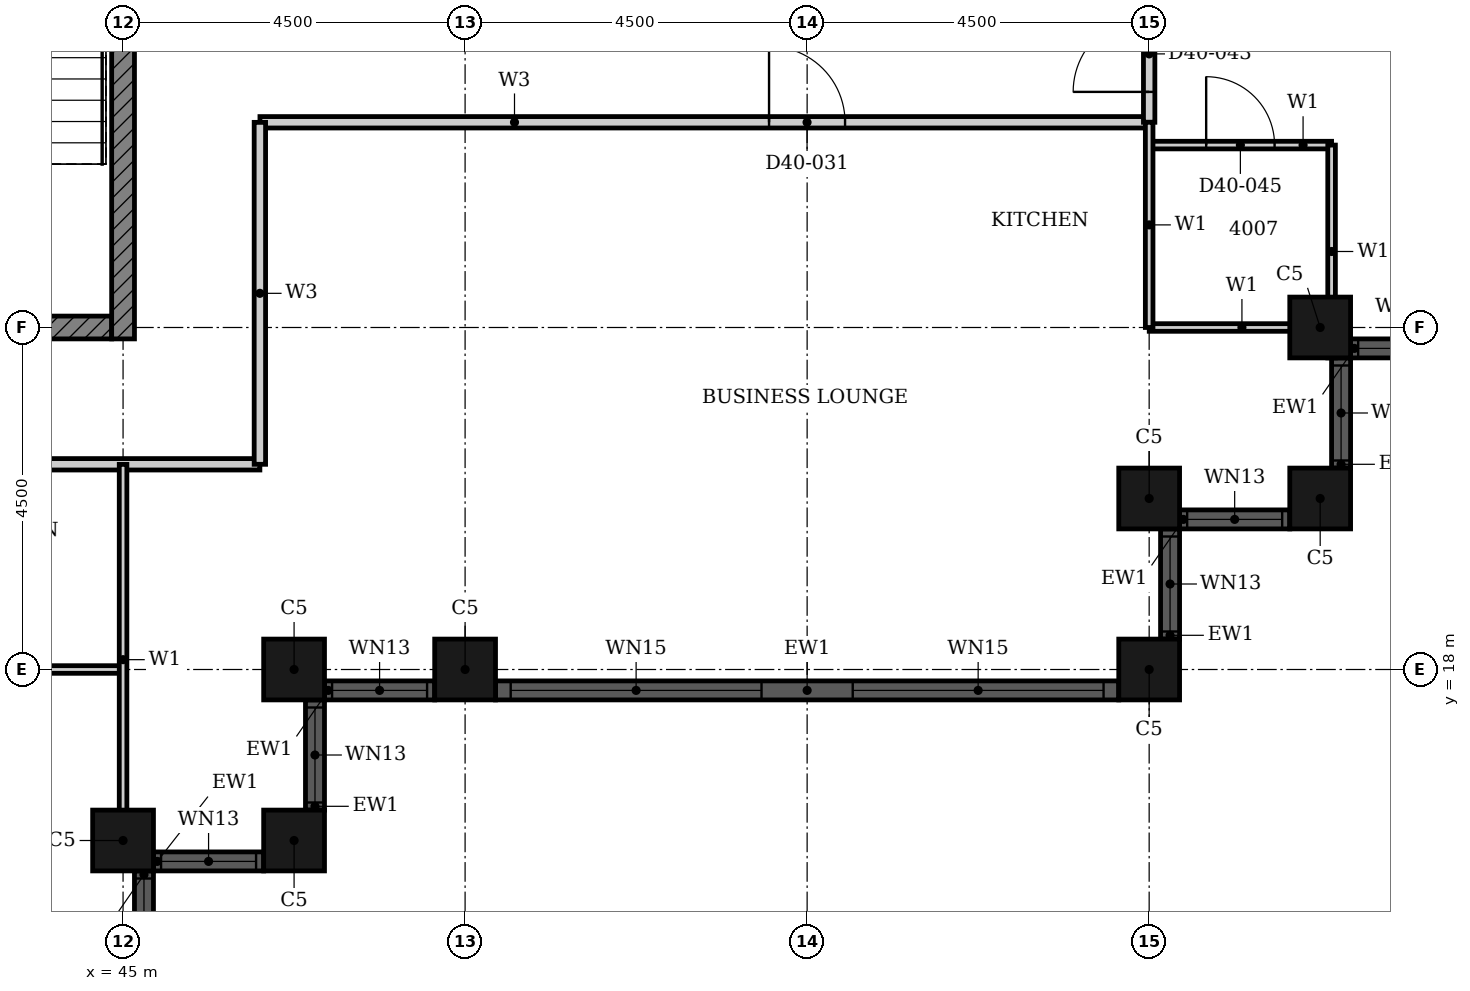
"""IFC4 building model, lengths in metres.
Left out: names, types, materials, properties, quantities, classifications, styles, units other than length and angle.
Written with IfcOpenShell. Run it as: python <this file> out.ifc"""

import sys

from ifc_helpers import new_model, si_unit, direction, frame, frame_2d, origin, origin_2d, place, context, subcontext, project, spatial, rectangle, hollow_rectangle, extrude, element, fill, save


model = new_model("IFC4")
c1 = context("Model", 3, precision=1e-05, world=origin(), true_north=direction((0.0, 1.0)))
c2 = subcontext(c1, "Body", "Model", "MODEL_VIEW")
j1 = project(units=[si_unit("LENGTHUNIT", "METRE"), si_unit("PLANEANGLEUNIT", "RADIAN")], contexts=[c1])
p1 = place(None, origin())
s1 = spatial("IfcSite", under=j1, at=p1, CompositionType="ELEMENT")
p2 = place(p1, origin())
s2 = spatial("IfcBuilding", under=s1, at=p2, CompositionType="ELEMENT")
p3 = place(p2, frame((0.0, 0.0, 161.7)))
s3 = spatial("IfcBuildingStorey", under=s2, at=p3, CompositionType="ELEMENT", Elevation=161.7)
for number, where, z_axis, x_axis in (
    (1, (45.0, 15.75, 0.0), (0.0, 0.0, 1.0), (1.0, 0.0, 0.0)),
    (2, (47.25, 15.75, 0.0), (0.0, 0.0, 1.0), (1.0, 0.0, 0.0)),
    (3, (47.25, 18.0, 0.0), (0.0, 0.0, 1.0), (1.0, 0.0, 0.0)),
    (4, (49.5, 18.0, 0.0), (0.0, 0.0, 1.0), (1.0, 0.0, 0.0)),
    (5, (58.5, 18.0, 0.0), (0.0, 0.0, 1.0), (1.0, 0.0, 0.0)),
    (6, (58.5, 20.25, 0.0), (0.0, 0.0, 1.0), (1.0, 0.0, 0.0)),
    (7, (60.75, 20.25, 0.0), (0.0, 0.0, 1.0), (1.0, 0.0, 0.0)),
    (8, (60.75, 22.5, 0.0), (0.0, 0.0, 1.0), (1.0, 0.0, 0.0)),
):
    element("IfcColumn", number, at=place(p3, frame(where, z_axis=z_axis, x_axis=x_axis)), inside=s3, PredefinedType="COLUMN", context=c2, shape_type="SweptSolid", body=[
        extrude(hollow_rectangle(XDim=0.8, YDim=0.8, WallThickness=0.025, at=origin_2d()), origin(), (0.0, 0.0, 1.0), 3.7),
    ])
p4 = place(p3, frame((45.275, 13.9, 0.0), z_axis=(0.0, 0.0, 1.0), x_axis=(0.0, 1.0, 0.0)))
e9 = element("IfcWall", 9, at=p4, inside=s3, PredefinedType="SOLIDWALL", context=c2, shape_type="SweptSolid", body=[
    extrude(rectangle(XDim=1.45, YDim=0.25, at=frame_2d((0.725, 0.0))), origin(), (0.0, 0.0, 1.0), 3.7),
])
p5 = place(p4, frame((0.1, 0.0, 0.9)))
e10 = element("IfcOpeningElement", 10, at=p5, cuts=e9, PredefinedType="OPENING", context=c2, shape_type="SweptSolid", body=[
    extrude(rectangle(XDim=1.25, YDim=1.85, at=frame_2d((0.625, 0.925))), frame((0.0, 0.135, 0.0), z_axis=(0.0, -1.0, 0.0), x_axis=(1.0, 0.0, 0.0)), (0.0, 0.0, 1.0), 0.27),
])
p6 = place(p3, frame((45.4, 15.475, 0.0), z_axis=(0.0, 0.0, 1.0), x_axis=(1.0, 0.0, 0.0)))
e11 = element("IfcWall", 11, at=p6, inside=s3, PredefinedType="SOLIDWALL", context=c2, shape_type="SweptSolid", body=[
    extrude(rectangle(XDim=1.45, YDim=0.25, at=frame_2d((0.725, 0.0))), origin(), (0.0, 0.0, 1.0), 3.7),
])
p7 = place(p6, frame((0.1, 0.0, 0.9)))
e12 = element("IfcOpeningElement", 12, at=p7, cuts=e11, PredefinedType="OPENING", context=c2, shape_type="SweptSolid", body=[
    extrude(rectangle(XDim=1.25, YDim=1.85, at=frame_2d((0.625, 0.925))), frame((0.0, 0.135, 0.0), z_axis=(0.0, -1.0, 0.0), x_axis=(1.0, 0.0, 0.0)), (0.0, 0.0, 1.0), 0.27),
])
p8 = place(p3, frame((47.525, 16.15, 0.0), z_axis=(0.0, 0.0, 1.0), x_axis=(0.0, 1.0, 0.0)))
e13 = element("IfcWall", 13, at=p8, inside=s3, PredefinedType="SOLIDWALL", context=c2, shape_type="SweptSolid", body=[
    extrude(rectangle(XDim=1.45, YDim=0.25, at=frame_2d((0.725, 0.0))), origin(), (0.0, 0.0, 1.0), 3.7),
])
p9 = place(p8, frame((0.1, 0.0, 0.9)))
e14 = element("IfcOpeningElement", 14, at=p9, cuts=e13, PredefinedType="OPENING", context=c2, shape_type="SweptSolid", body=[
    extrude(rectangle(XDim=1.25, YDim=1.85, at=frame_2d((0.625, 0.925))), frame((0.0, 0.135, 0.0), z_axis=(0.0, -1.0, 0.0), x_axis=(1.0, 0.0, 0.0)), (0.0, 0.0, 1.0), 0.27),
])
p10 = place(p3, frame((47.65, 17.725, 0.0), z_axis=(0.0, 0.0, 1.0), x_axis=(1.0, 0.0, 0.0)))
e15 = element("IfcWall", 15, at=p10, inside=s3, PredefinedType="SOLIDWALL", context=c2, shape_type="SweptSolid", body=[
    extrude(rectangle(XDim=1.45, YDim=0.25, at=frame_2d((0.725, 0.0))), origin(), (0.0, 0.0, 1.0), 3.7),
])
p11 = place(p10, frame((0.1, 0.0, 0.9)))
e16 = element("IfcOpeningElement", 16, at=p11, cuts=e15, PredefinedType="OPENING", context=c2, shape_type="SweptSolid", body=[
    extrude(rectangle(XDim=1.25, YDim=1.85, at=frame_2d((0.625, 0.925))), frame((0.0, 0.135, 0.0), z_axis=(0.0, -1.0, 0.0), x_axis=(1.0, 0.0, 0.0)), (0.0, 0.0, 1.0), 0.27),
])
p12 = place(p3, frame((49.9, 17.725, 0.0), z_axis=(0.0, 0.0, 1.0), x_axis=(1.0, 0.0, 0.0)))
e17 = element("IfcWall", 17, at=p12, inside=s3, PredefinedType="SOLIDWALL", context=c2, shape_type="SweptSolid", body=[
    extrude(rectangle(XDim=8.2, YDim=0.25, at=frame_2d((4.1, 0.0))), origin(), (0.0, 0.0, 1.0), 3.7),
])
p13 = place(p12, frame((0.2, 0.0, 0.45)))
e18 = element("IfcOpeningElement", 18, at=p13, cuts=e17, PredefinedType="OPENING", context=c2, shape_type="SweptSolid", body=[
    extrude(rectangle(XDim=3.3, YDim=2.3, at=frame_2d((1.65, 1.15))), frame((0.0, 0.135, 0.0), z_axis=(0.0, -1.0, 0.0), x_axis=(1.0, 0.0, 0.0)), (0.0, 0.0, 1.0), 0.27),
])
p14 = place(p12, frame((4.7, 0.0, 0.45)))
e19 = element("IfcOpeningElement", 19, at=p14, cuts=e17, PredefinedType="OPENING", context=c2, shape_type="SweptSolid", body=[
    extrude(rectangle(XDim=3.3, YDim=2.3, at=frame_2d((1.65, 1.15))), frame((0.0, 0.135, 0.0), z_axis=(0.0, -1.0, 0.0), x_axis=(1.0, 0.0, 0.0)), (0.0, 0.0, 1.0), 0.27),
])
p15 = place(p3, frame((58.775, 18.4, 0.0), z_axis=(0.0, 0.0, 1.0), x_axis=(0.0, 1.0, 0.0)))
e20 = element("IfcWall", 20, at=p15, inside=s3, PredefinedType="SOLIDWALL", context=c2, shape_type="SweptSolid", body=[
    extrude(rectangle(XDim=1.45, YDim=0.25, at=frame_2d((0.725, 0.0))), origin(), (0.0, 0.0, 1.0), 3.7),
])
p16 = place(p15, frame((0.1, 0.0, 0.9)))
e21 = element("IfcOpeningElement", 21, at=p16, cuts=e20, PredefinedType="OPENING", context=c2, shape_type="SweptSolid", body=[
    extrude(rectangle(XDim=1.25, YDim=1.85, at=frame_2d((0.625, 0.925))), frame((0.0, 0.135, 0.0), z_axis=(0.0, -1.0, 0.0), x_axis=(1.0, 0.0, 0.0)), (0.0, 0.0, 1.0), 0.27),
])
p17 = place(p3, frame((58.9, 19.975, 0.0), z_axis=(0.0, 0.0, 1.0), x_axis=(1.0, 0.0, 0.0)))
e22 = element("IfcWall", 22, at=p17, inside=s3, PredefinedType="SOLIDWALL", context=c2, shape_type="SweptSolid", body=[
    extrude(rectangle(XDim=1.45, YDim=0.25, at=frame_2d((0.725, 0.0))), origin(), (0.0, 0.0, 1.0), 3.7),
])
p18 = place(p17, frame((0.1, 0.0, 0.9)))
e23 = element("IfcOpeningElement", 23, at=p18, cuts=e22, PredefinedType="OPENING", context=c2, shape_type="SweptSolid", body=[
    extrude(rectangle(XDim=1.25, YDim=1.85, at=frame_2d((0.625, 0.925))), frame((0.0, 0.135, 0.0), z_axis=(0.0, -1.0, 0.0), x_axis=(1.0, 0.0, 0.0)), (0.0, 0.0, 1.0), 0.27),
])
p19 = place(p3, frame((61.025, 20.65, 0.0), z_axis=(0.0, 0.0, 1.0), x_axis=(0.0, 1.0, 0.0)))
e24 = element("IfcWall", 24, at=p19, inside=s3, PredefinedType="SOLIDWALL", context=c2, shape_type="SweptSolid", body=[
    extrude(rectangle(XDim=1.45, YDim=0.25, at=frame_2d((0.725, 0.0))), origin(), (0.0, 0.0, 1.0), 3.7),
])
p20 = place(p19, frame((0.1, 0.0, 0.9)))
e25 = element("IfcOpeningElement", 25, at=p20, cuts=e24, PredefinedType="OPENING", context=c2, shape_type="SweptSolid", body=[
    extrude(rectangle(XDim=1.25, YDim=1.85, at=frame_2d((0.625, 0.925))), frame((0.0, 0.135, 0.0), z_axis=(0.0, -1.0, 0.0), x_axis=(1.0, 0.0, 0.0)), (0.0, 0.0, 1.0), 0.27),
])
p21 = place(p3, frame((61.15, 22.225, 0.0), z_axis=(0.0, 0.0, 1.0), x_axis=(1.0, 0.0, 0.0)))
e26 = element("IfcWall", 26, at=p21, inside=s3, PredefinedType="SOLIDWALL", context=c2, shape_type="SweptSolid", body=[
    extrude(rectangle(XDim=1.45, YDim=0.25, at=frame_2d((0.725, 0.0))), origin(), (0.0, 0.0, 1.0), 3.7),
])
p22 = place(p21, frame((0.1, 0.0, 0.9)))
e27 = element("IfcOpeningElement", 27, at=p22, cuts=e26, PredefinedType="OPENING", context=c2, shape_type="SweptSolid", body=[
    extrude(rectangle(XDim=1.25, YDim=1.85, at=frame_2d((0.625, 0.925))), frame((0.0, 0.135, 0.0), z_axis=(0.0, -1.0, 0.0), x_axis=(1.0, 0.0, 0.0)), (0.0, 0.0, 1.0), 0.27),
])
p23 = place(p3, frame((32.911, 22.5, 0.0), z_axis=(0.0, 0.0, 1.0), x_axis=(1.0, 0.0, 0.0)))
e28 = element("IfcWall", 28, at=p23, inside=s3, PredefinedType="SHEAR", context=c2, shape_type="SweptSolid", body=[
    extrude(rectangle(XDim=11.939, YDim=0.3, at=frame_2d((5.97, 0.0))), origin(), (0.0, 0.0, 1.0), 3.4),
])
p24 = place(p23, frame((5.404, 0.0, 0.0)))
e29 = element("IfcOpeningElement", 29, at=p24, cuts=e28, PredefinedType="OPENING", context=c2, shape_type="SweptSolid", body=[
    extrude(rectangle(XDim=1.8, YDim=2.1, at=frame_2d((0.9, 1.05))), frame((0.0, 0.16, 0.0), z_axis=(0.0, -1.0, 0.0), x_axis=(1.0, 0.0, 0.0)), (0.0, 0.0, 1.0), 0.32),
])
p25 = place(p3, frame((45.0, 22.35, 0.0), z_axis=(0.0, 0.0, 1.0), x_axis=(0.0, 1.0, 0.0)))
e30 = element("IfcWall", 30, at=p25, inside=s3, PredefinedType="SHEAR", context=c2, shape_type="SweptSolid", body=[
    extrude(rectangle(XDim=9.3, YDim=0.3, at=frame_2d((4.65, 0.0))), origin(), (0.0, 0.0, 1.0), 3.4),
])
p26 = place(p3, frame((38.4, 20.7, 0.0), z_axis=(0.0, 0.0, 1.0), x_axis=(1.0, 0.0, 0.0)))
e31 = element("IfcWall", 31, at=p26, inside=s3, PredefinedType="PARTITIONING", context=c2, shape_type="SweptSolid", body=[
    extrude(rectangle(XDim=8.4, YDim=0.15, at=frame_2d((4.2, 0.0))), origin(), (0.0, 0.0, 1.0), 3.4),
])
p27 = place(p3, frame((46.801, 25.2, 0.0), z_axis=(0.0, 0.0, 1.0), x_axis=(1.0, 0.0, 0.0)))
e32 = element("IfcWall", 32, at=p27, inside=s3, PredefinedType="PARTITIONING", context=c2, shape_type="SweptSolid", body=[
    extrude(rectangle(XDim=11.699, YDim=0.15, at=frame_2d((5.85, 0.0))), origin(), (0.0, 0.0, 1.0), 3.4),
])
p28 = place(p27, frame((6.698, 0.0, 0.0)))
e33 = element("IfcOpeningElement", 33, at=p28, cuts=e32, PredefinedType="OPENING", context=c2, shape_type="SweptSolid", body=[
    extrude(rectangle(XDim=1.0, YDim=2.1, at=frame_2d((0.5, 1.05))), frame((0.0, 0.085, 0.0), z_axis=(0.0, -1.0, 0.0), x_axis=(1.0, 0.0, 0.0)), (0.0, 0.0, 1.0), 0.17),
])
p29 = place(p3, frame((46.8, 20.7, 0.0), z_axis=(0.0, 0.0, 1.0), x_axis=(0.0, 1.0, 0.0)))
e34 = element("IfcWall", 34, at=p29, inside=s3, PredefinedType="PARTITIONING", context=c2, shape_type="SweptSolid", body=[
    extrude(rectangle(XDim=4.499, YDim=0.15, at=frame_2d((2.25, 0.0))), origin(), (0.0, 0.0, 1.0), 3.4),
])
p30 = place(p3, frame((58.5, 25.2, 0.0), z_axis=(0.0, 0.0, 1.0), x_axis=(0.0, 1.0, 0.0)))
e35 = element("IfcWall", 35, at=p30, inside=s3, PredefinedType="PARTITIONING", context=c2, shape_type="SweptSolid", body=[
    extrude(rectangle(XDim=1.8, YDim=0.15, at=frame_2d((0.9, 0.0))), origin(), (0.0, 0.0, 1.0), 3.4),
])
p31 = place(p30, frame((0.4, 0.0, 0.0)))
e36 = element("IfcOpeningElement", 36, at=p31, cuts=e35, PredefinedType="OPENING", context=c2, shape_type="SweptSolid", body=[
    extrude(rectangle(XDim=1.0, YDim=2.2, at=frame_2d((0.5, 1.1))), frame((0.0, 0.085, 0.0), z_axis=(0.0, -1.0, 0.0), x_axis=(1.0, 0.0, 0.0)), (0.0, 0.0, 1.0), 0.17),
])
p32 = place(p3, frame((42.0, 18.0, 0.0), z_axis=(0.0, 0.0, 1.0), x_axis=(1.0, 0.0, 0.0)))
e37 = element("IfcWall", 37, at=p32, inside=s3, PredefinedType="PARTITIONING", context=c2, shape_type="SweptSolid", body=[
    extrude(rectangle(XDim=3.0, YDim=0.1, at=frame_2d((1.5, 0.0))), origin(), (0.0, 0.0, 1.0), 3.4),
])
p33 = place(p32, frame((1.05, 0.0, 0.0)))
e38 = element("IfcOpeningElement", 38, at=p33, cuts=e37, PredefinedType="OPENING", context=c2, shape_type="SweptSolid", body=[
    extrude(rectangle(XDim=0.9, YDim=2.1, at=frame_2d((0.45, 1.05))), frame((0.0, 0.06, 0.0), z_axis=(0.0, -1.0, 0.0), x_axis=(1.0, 0.0, 0.0)), (0.0, 0.0, 1.0), 0.12),
])
p34 = place(p3, frame((58.501, 22.5, 0.0), z_axis=(0.0, 0.0, 1.0), x_axis=(1.0, 0.0, 0.0)))
e39 = element("IfcWall", 39, at=p34, inside=s3, PredefinedType="PARTITIONING", context=c2, shape_type="SweptSolid", body=[
    extrude(rectangle(XDim=2.439, YDim=0.1, at=frame_2d((1.219, 0.0))), origin(), (0.0, 0.0, 1.0), 2.68),
])
p35 = place(p3, frame((58.5, 24.9, 0.0), z_axis=(0.0, 0.0, 1.0), x_axis=(1.0, 0.0, 0.0)))
e40 = element("IfcWall", 40, at=p35, inside=s3, PredefinedType="PARTITIONING", context=c2, shape_type="SweptSolid", body=[
    extrude(rectangle(XDim=2.4, YDim=0.1, at=frame_2d((1.2, 0.0))), origin(), (0.0, 0.0, 1.0), 3.4),
])
p36 = place(p35, frame((0.75, 0.0, 0.0)))
e41 = element("IfcOpeningElement", 41, at=p36, cuts=e40, PredefinedType="OPENING", context=c2, shape_type="SweptSolid", body=[
    extrude(rectangle(XDim=0.9, YDim=2.1, at=frame_2d((0.45, 1.05))), frame((0.0, 0.06, 0.0), z_axis=(0.0, -1.0, 0.0), x_axis=(1.0, 0.0, 0.0)), (0.0, 0.0, 1.0), 0.12),
])
p37 = place(p3, frame((45.0, 15.56, 0.0), z_axis=(0.0, 0.0, 1.0), x_axis=(0.0, 1.0, 0.0)))
e42 = element("IfcWall", 42, at=p37, inside=s3, PredefinedType="PARTITIONING", context=c2, shape_type="SweptSolid", body=[
    extrude(rectangle(XDim=5.139, YDim=0.1, at=frame_2d((2.569, 0.0))), origin(), (0.0, 0.0, 1.0), 3.4),
])
p38 = place(p3, frame((58.5, 22.5, 0.0), z_axis=(0.0, 0.0, 1.0), x_axis=(0.0, 1.0, 0.0)))
e43 = element("IfcWall", 43, at=p38, inside=s3, PredefinedType="PARTITIONING", context=c2, shape_type="SweptSolid", body=[
    extrude(rectangle(XDim=2.7, YDim=0.1, at=frame_2d((1.35, 0.0))), origin(), (0.0, 0.0, 1.0), 3.4),
])
p39 = place(p3, frame((60.9, 22.1, 0.0), z_axis=(0.0, 0.0, 1.0), x_axis=(0.0, 1.0, 0.0)))
e44 = element("IfcWall", 44, at=p39, inside=s3, PredefinedType="PARTITIONING", context=c2, shape_type="SweptSolid", body=[
    extrude(rectangle(XDim=2.8, YDim=0.1, at=frame_2d((1.4, 0.0))), origin(), (0.0, 0.0, 1.0), 3.4),
])
p40 = place(p5, origin())
e45 = element("IfcWindow", 45, at=p40, inside=s3, PartitioningType="SINGLE_PANEL", PredefinedType="WINDOW", context=c2, shape_type="SweptSolid", body=[
    extrude(rectangle(XDim=1.25, YDim=1.85, at=frame_2d((0.625, 0.925))), frame((0.0, 0.03, 0.0), z_axis=(0.0, -1.0, 0.0), x_axis=(1.0, 0.0, 0.0)), (0.0, 0.0, 1.0), 0.06),
])
fill(e10, e45)
p41 = place(p7, origin())
e46 = element("IfcWindow", 46, at=p41, inside=s3, PartitioningType="SINGLE_PANEL", PredefinedType="WINDOW", context=c2, shape_type="SweptSolid", body=[
    extrude(rectangle(XDim=1.25, YDim=1.85, at=frame_2d((0.625, 0.925))), frame((0.0, 0.03, 0.0), z_axis=(0.0, -1.0, 0.0), x_axis=(1.0, 0.0, 0.0)), (0.0, 0.0, 1.0), 0.06),
])
fill(e12, e46)
p42 = place(p9, origin())
e47 = element("IfcWindow", 47, at=p42, inside=s3, PartitioningType="SINGLE_PANEL", PredefinedType="WINDOW", context=c2, shape_type="SweptSolid", body=[
    extrude(rectangle(XDim=1.25, YDim=1.85, at=frame_2d((0.625, 0.925))), frame((0.0, 0.03, 0.0), z_axis=(0.0, -1.0, 0.0), x_axis=(1.0, 0.0, 0.0)), (0.0, 0.0, 1.0), 0.06),
])
fill(e14, e47)
p43 = place(p11, origin())
e48 = element("IfcWindow", 48, at=p43, inside=s3, PartitioningType="SINGLE_PANEL", PredefinedType="WINDOW", context=c2, shape_type="SweptSolid", body=[
    extrude(rectangle(XDim=1.25, YDim=1.85, at=frame_2d((0.625, 0.925))), frame((0.0, 0.03, 0.0), z_axis=(0.0, -1.0, 0.0), x_axis=(1.0, 0.0, 0.0)), (0.0, 0.0, 1.0), 0.06),
])
fill(e16, e48)
p44 = place(p13, origin())
e49 = element("IfcWindow", 49, at=p44, inside=s3, PartitioningType="SINGLE_PANEL", PredefinedType="WINDOW", context=c2, shape_type="SweptSolid", body=[
    extrude(rectangle(XDim=3.3, YDim=2.3, at=frame_2d((1.65, 1.15))), frame((0.0, 0.03, 0.0), z_axis=(0.0, -1.0, 0.0), x_axis=(1.0, 0.0, 0.0)), (0.0, 0.0, 1.0), 0.06),
])
fill(e18, e49)
p45 = place(p14, origin())
e50 = element("IfcWindow", 50, at=p45, inside=s3, PartitioningType="SINGLE_PANEL", PredefinedType="WINDOW", context=c2, shape_type="SweptSolid", body=[
    extrude(rectangle(XDim=3.3, YDim=2.3, at=frame_2d((1.65, 1.15))), frame((0.0, 0.03, 0.0), z_axis=(0.0, -1.0, 0.0), x_axis=(1.0, 0.0, 0.0)), (0.0, 0.0, 1.0), 0.06),
])
fill(e19, e50)
p46 = place(p16, origin())
e51 = element("IfcWindow", 51, at=p46, inside=s3, PartitioningType="SINGLE_PANEL", PredefinedType="WINDOW", context=c2, shape_type="SweptSolid", body=[
    extrude(rectangle(XDim=1.25, YDim=1.85, at=frame_2d((0.625, 0.925))), frame((0.0, 0.03, 0.0), z_axis=(0.0, -1.0, 0.0), x_axis=(1.0, 0.0, 0.0)), (0.0, 0.0, 1.0), 0.06),
])
fill(e21, e51)
p47 = place(p18, origin())
e52 = element("IfcWindow", 52, at=p47, inside=s3, PartitioningType="SINGLE_PANEL", PredefinedType="WINDOW", context=c2, shape_type="SweptSolid", body=[
    extrude(rectangle(XDim=1.25, YDim=1.85, at=frame_2d((0.625, 0.925))), frame((0.0, 0.03, 0.0), z_axis=(0.0, -1.0, 0.0), x_axis=(1.0, 0.0, 0.0)), (0.0, 0.0, 1.0), 0.06),
])
fill(e23, e52)
p48 = place(p20, origin())
e53 = element("IfcWindow", 53, at=p48, inside=s3, PartitioningType="SINGLE_PANEL", PredefinedType="WINDOW", context=c2, shape_type="SweptSolid", body=[
    extrude(rectangle(XDim=1.25, YDim=1.85, at=frame_2d((0.625, 0.925))), frame((0.0, 0.03, 0.0), z_axis=(0.0, -1.0, 0.0), x_axis=(1.0, 0.0, 0.0)), (0.0, 0.0, 1.0), 0.06),
])
fill(e25, e53)
p49 = place(p22, origin())
e54 = element("IfcWindow", 54, at=p49, inside=s3, PartitioningType="SINGLE_PANEL", PredefinedType="WINDOW", context=c2, shape_type="SweptSolid", body=[
    extrude(rectangle(XDim=1.25, YDim=1.85, at=frame_2d((0.625, 0.925))), frame((0.0, 0.03, 0.0), z_axis=(0.0, -1.0, 0.0), x_axis=(1.0, 0.0, 0.0)), (0.0, 0.0, 1.0), 0.06),
])
fill(e27, e54)
p50 = place(p28, origin())
e55 = element("IfcDoor", 55, at=p50, inside=s3, OperationType="SINGLE_SWING_RIGHT", PredefinedType="DOOR", context=c2, shape_type="SweptSolid", body=[
    extrude(rectangle(XDim=1.0, YDim=2.1, at=frame_2d((0.5, 1.05))), frame((0.0, 0.025, 0.0), z_axis=(0.0, -1.0, 0.0), x_axis=(1.0, 0.0, 0.0)), (0.0, 0.0, 1.0), 0.05),
])
fill(e33, e55)
p51 = place(p31, origin())
e56 = element("IfcDoor", 56, at=p51, inside=s3, OperationType="SINGLE_SWING_RIGHT", PredefinedType="DOOR", context=c2, shape_type="SweptSolid", body=[
    extrude(rectangle(XDim=1.0, YDim=2.2, at=frame_2d((0.5, 1.1))), frame((0.0, 0.025, 0.0), z_axis=(0.0, -1.0, 0.0), x_axis=(1.0, 0.0, 0.0)), (0.0, 0.0, 1.0), 0.05),
])
fill(e36, e56)
p52 = place(p36, origin())
e57 = element("IfcDoor", 57, at=p52, inside=s3, OperationType="SINGLE_SWING_LEFT", PredefinedType="DOOR", context=c2, shape_type="SweptSolid", body=[
    extrude(rectangle(XDim=0.9, YDim=2.1, at=frame_2d((0.45, 1.05))), frame((0.0, 0.025, 0.0), z_axis=(0.0, -1.0, 0.0), x_axis=(1.0, 0.0, 0.0)), (0.0, 0.0, 1.0), 0.05),
])
fill(e41, e57)
save(model, sys.argv[1])
